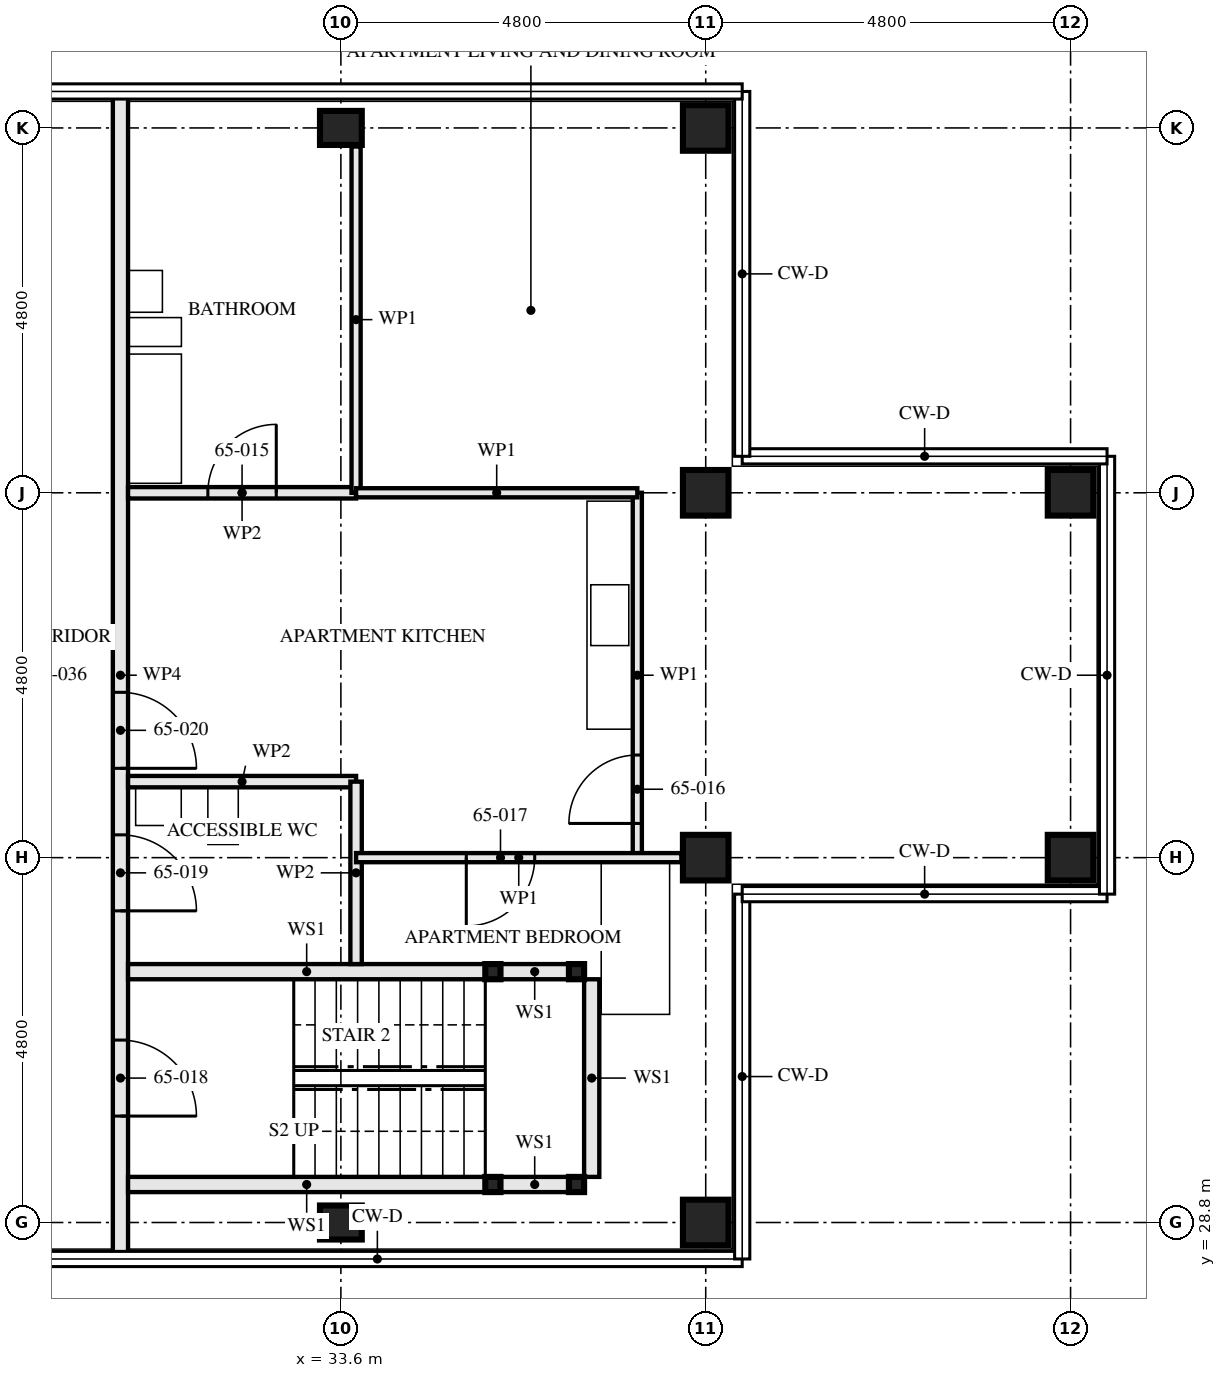
"""IFC4 building model, lengths in metres.
Left out: names, types, materials, properties, quantities, classifications, styles, units other than length and angle.
Written with IfcOpenShell. Run it as: python <this file> out.ifc"""

import sys

from ifc_helpers import new_model, si_unit, direction, frame, frame_2d, origin, origin_2d, place, context, subcontext, project, spatial, rectangle, hollow_rectangle, i_section, extrude, element, fill, save


model = new_model("IFC4")
c1 = context("Model", 3, precision=1e-05, world=origin(), true_north=direction((0.0, 1.0)))
c2 = subcontext(c1, "Body", "Model", "MODEL_VIEW")
j1 = project(units=[si_unit("LENGTHUNIT", "METRE"), si_unit("PLANEANGLEUNIT", "RADIAN")], contexts=[c1])
p1 = place(None, origin())
s1 = spatial("IfcSite", under=j1, at=p1, CompositionType="ELEMENT")
p2 = place(p1, origin())
s2 = spatial("IfcBuilding", under=s1, at=p2, CompositionType="ELEMENT")
p3 = place(p2, frame((0.0, 0.0, 236.5)))
s3 = spatial("IfcBuildingStorey", under=s2, at=p3, CompositionType="ELEMENT", Elevation=236.5)
for number, where, z_axis, x_axis in (
    (1, (33.6, 28.8, 0.0), (0.0, 0.0, 1.0), (0.0, 1.0, 0.0)),
    (2, (33.6, 43.2, 0.0), (0.0, 0.0, 1.0), (0.0, 1.0, 0.0)),
):
    element("IfcColumn", number, at=place(p3, frame(where, z_axis=z_axis, x_axis=x_axis)), inside=s3, PredefinedType="COLUMN", context=c2, shape_type="SweptSolid", body=[
        extrude(i_section(OverallWidth=0.448, OverallDepth=0.55, WebThickness=0.072, FlangeThickness=0.115, FilletRadius=0.015, at=origin_2d()), origin(), (0.0, 0.0, 1.0), 3.5),
    ])
for number, where, z_axis, x_axis in (
    (3, (38.4, 28.8, 0.0), (0.0, 0.0, 1.0), (0.0, 1.0, 0.0)),
    (4, (38.4, 33.6, 0.0), (0.0, 0.0, 1.0), (0.0, 1.0, 0.0)),
    (5, (38.4, 38.4, 0.0), (0.0, 0.0, 1.0), (0.0, 1.0, 0.0)),
    (6, (38.4, 43.2, 0.0), (0.0, 0.0, 1.0), (0.0, 1.0, 0.0)),
    (7, (43.2, 33.6, 0.0), (0.0, 0.0, 1.0), (0.0, 1.0, 0.0)),
    (8, (43.2, 38.4, 0.0), (0.0, 0.0, 1.0), (0.0, 1.0, 0.0)),
):
    element("IfcColumn", number, at=place(p3, frame(where, z_axis=z_axis, x_axis=x_axis)), inside=s3, PredefinedType="COLUMN", context=c2, shape_type="SweptSolid", body=[
        extrude(hollow_rectangle(XDim=0.6, YDim=0.6, WallThickness=0.05, at=origin_2d()), origin(), (0.0, 0.0, 1.0), 3.5),
    ])
for number, where, z_axis, x_axis in (
    (9, (36.7, 29.3, 0.0), (0.0, 0.0, 1.0), (1.0, 0.0, 0.0)),
    (10, (36.7, 32.1, 0.0), (0.0, 0.0, 1.0), (1.0, 0.0, 0.0)),
    (11, (35.6, 29.3, 0.0), (0.0, 0.0, 1.0), (1.0, 0.0, 0.0)),
    (12, (35.6, 32.1, 0.0), (0.0, 0.0, 1.0), (1.0, 0.0, 0.0)),
):
    element("IfcColumn", number, at=place(p3, frame(where, z_axis=z_axis, x_axis=x_axis)), inside=s3, PredefinedType="COLUMN", context=c2, shape_type="SweptSolid", body=[
        extrude(hollow_rectangle(XDim=0.2, YDim=0.2, WallThickness=0.008, at=origin_2d()), origin(), (0.0, 0.0, 1.0), 3.33),
    ])
p4 = place(p3, frame((36.6, 29.3, 0.0), z_axis=(0.0, 0.0, 1.0), x_axis=(-1.0, 0.0, 0.0)))
e13 = element("IfcWall", 13, at=p4, inside=s3, PredefinedType="SOLIDWALL", context=c2, shape_type="SweptSolid", body=[
    extrude(rectangle(XDim=0.9, YDim=0.2, at=frame_2d((0.45, 0.0))), origin(), (0.0, 0.0, 1.0), 2.99),
])
p5 = place(p3, frame((35.5, 29.3, 0.0), z_axis=(0.0, 0.0, 1.0), x_axis=(-1.0, 0.0, 0.0)))
e14 = element("IfcWall", 14, at=p5, inside=s3, PredefinedType="SOLIDWALL", context=c2, shape_type="SweptSolid", body=[
    extrude(rectangle(XDim=4.7, YDim=0.2, at=frame_2d((2.35, 0.0))), origin(), (0.0, 0.0, 1.0), 2.99),
])
p6 = place(p3, frame((36.6, 32.1, 0.0), z_axis=(0.0, 0.0, 1.0), x_axis=(-1.0, 0.0, 0.0)))
e15 = element("IfcWall", 15, at=p6, inside=s3, PredefinedType="SOLIDWALL", context=c2, shape_type="SweptSolid", body=[
    extrude(rectangle(XDim=0.9, YDim=0.2, at=frame_2d((0.45, 0.0))), origin(), (0.0, 0.0, 1.0), 2.99),
])
p7 = place(p3, frame((35.5, 32.1, 0.0), z_axis=(0.0, 0.0, 1.0), x_axis=(-1.0, 0.0, 0.0)))
e16 = element("IfcWall", 16, at=p7, inside=s3, PredefinedType="SOLIDWALL", context=c2, shape_type="SweptSolid", body=[
    extrude(rectangle(XDim=4.7, YDim=0.2, at=frame_2d((2.35, 0.0))), origin(), (0.0, 0.0, 1.0), 2.99),
])
p8 = place(p3, frame((36.9, 29.4, 0.0), z_axis=(0.0, 0.0, 1.0), x_axis=(0.0, 1.0, 0.0)))
e17 = element("IfcWall", 17, at=p8, inside=s3, PredefinedType="SOLIDWALL", context=c2, shape_type="SweptSolid", body=[
    extrude(rectangle(XDim=2.6, YDim=0.2, at=frame_2d((1.3, 0.0))), origin(), (0.0, 0.0, 1.0), 3.33),
])
p9 = place(p3, frame((33.8, 32.2, 0.0), z_axis=(0.0, 0.0, 1.0), x_axis=(0.0, 1.0, 0.0)))
e18 = element("IfcWall", 18, at=p9, inside=s3, PredefinedType="PARTITIONING", context=c2, shape_type="SweptSolid", body=[
    extrude(rectangle(XDim=2.4, YDim=0.15, at=frame_2d((1.2, 0.0))), origin(), (0.0, 0.0, 1.0), 2.55),
])
p10 = place(p3, frame((33.8, 34.6, 0.0), z_axis=(0.0, 0.0, 1.0), x_axis=(-1.0, 0.0, 0.0)))
e19 = element("IfcWall", 19, at=p10, inside=s3, PredefinedType="PARTITIONING", context=c2, shape_type="SweptSolid", body=[
    extrude(rectangle(XDim=3.0, YDim=0.15, at=frame_2d((1.5, 0.0))), origin(), (0.0, 0.0, 1.0), 3.33),
])
p11 = place(p3, frame((33.8, 38.4, 0.0), z_axis=(0.0, 0.0, 1.0), x_axis=(-1.0, 0.0, 0.0)))
e20 = element("IfcWall", 20, at=p11, inside=s3, PredefinedType="PARTITIONING", context=c2, shape_type="SweptSolid", body=[
    extrude(rectangle(XDim=3.0, YDim=0.15, at=frame_2d((1.5, 0.0))), origin(), (0.0, 0.0, 1.0), 2.55),
])
p12 = place(p11, frame((1.05, 0.0, 0.0)))
e21 = element("IfcOpeningElement", 21, at=p12, cuts=e20, PredefinedType="OPENING", context=c2, shape_type="SweptSolid", body=[
    extrude(rectangle(XDim=0.9, YDim=2.1, at=frame_2d((0.45, 1.05))), frame((0.0, 0.085, 0.0), z_axis=(0.0, -1.0, 0.0), x_axis=(1.0, 0.0, 0.0)), (0.0, 0.0, 1.0), 0.171),
])
p13 = place(p3, frame((37.5, 33.6, 0.0), z_axis=(0.0, 0.0, 1.0), x_axis=(0.0, 1.0, 0.0)))
e22 = element("IfcWall", 22, at=p13, inside=s3, PredefinedType="PARTITIONING", context=c2, shape_type="SweptSolid", body=[
    extrude(rectangle(XDim=4.8, YDim=0.12, at=frame_2d((2.4, 0.0))), origin(), (0.0, 0.0, 1.0), 3.33),
])
p14 = place(p13, frame((0.45, 0.0, 0.0)))
e23 = element("IfcOpeningElement", 23, at=p14, cuts=e22, PredefinedType="OPENING", context=c2, shape_type="SweptSolid", body=[
    extrude(rectangle(XDim=0.9, YDim=2.1, at=frame_2d((0.45, 1.05))), frame((0.0, 0.071, 0.0), z_axis=(0.0, -1.0, 0.0), x_axis=(1.0, 0.0, 0.0)), (0.0, 0.0, 1.0), 0.141),
])
p15 = place(p3, frame((33.8, 38.4, 0.0), z_axis=(0.0, 0.0, 1.0), x_axis=(0.0, 1.0, 0.0)))
e24 = element("IfcWall", 24, at=p15, inside=s3, PredefinedType="PARTITIONING", context=c2, shape_type="SweptSolid", body=[
    extrude(rectangle(XDim=4.556, YDim=0.12, at=frame_2d((2.278, 0.0))), origin(), (0.0, 0.0, 1.0), 3.33),
])
p16 = place(p3, frame((38.08, 33.6, 0.0), z_axis=(0.0, 0.0, 1.0), x_axis=(-1.0, 0.0, 0.0)))
e25 = element("IfcWall", 25, at=p16, inside=s3, PredefinedType="PARTITIONING", context=c2, shape_type="SweptSolid", body=[
    extrude(rectangle(XDim=4.28, YDim=0.12, at=frame_2d((2.14, 0.0))), origin(), (0.0, 0.0, 1.0), 2.55),
])
p17 = place(p16, frame((1.93, 0.0, 0.0)))
e26 = element("IfcOpeningElement", 26, at=p17, cuts=e25, PredefinedType="OPENING", context=c2, shape_type="SweptSolid", body=[
    extrude(rectangle(XDim=0.9, YDim=2.1, at=frame_2d((0.45, 1.05))), frame((0.0, 0.071, 0.0), z_axis=(0.0, -1.0, 0.0), x_axis=(1.0, 0.0, 0.0)), (0.0, 0.0, 1.0), 0.141),
])
p18 = place(p3, frame((37.5, 38.4, 0.0), z_axis=(0.0, 0.0, 1.0), x_axis=(-1.0, 0.0, 0.0)))
e27 = element("IfcWall", 27, at=p18, inside=s3, PredefinedType="PARTITIONING", context=c2, shape_type="SweptSolid", body=[
    extrude(rectangle(XDim=3.7, YDim=0.12, at=frame_2d((1.85, 0.0))), origin(), (0.0, 0.0, 1.0), 2.55),
])
p19 = place(p3, frame((30.7, 28.345, 0.0), z_axis=(0.0, 0.0, 1.0), x_axis=(0.0, 1.0, 0.0)))
e28 = element("IfcWall", 28, at=p19, inside=s3, PredefinedType="PARTITIONING", context=c2, shape_type="SweptSolid", body=[
    extrude(rectangle(XDim=15.31, YDim=0.2, at=frame_2d((7.655, 0.0))), origin(), (0.0, 0.0, 1.0), 2.32),
])
p20 = place(p19, frame((1.855, 0.0, 0.0)))
e29 = element("IfcOpeningElement", 29, at=p20, cuts=e28, PredefinedType="OPENING", context=c2, shape_type="SweptSolid", body=[
    extrude(rectangle(XDim=1.0, YDim=2.1, at=frame_2d((0.5, 1.05))), frame((0.0, 0.111, 0.0), z_axis=(0.0, -1.0, 0.0), x_axis=(1.0, 0.0, 0.0)), (0.0, 0.0, 1.0), 0.221),
])
p21 = place(p19, frame((4.555, 0.0, 0.0)))
e30 = element("IfcOpeningElement", 30, at=p21, cuts=e28, PredefinedType="OPENING", context=c2, shape_type="SweptSolid", body=[
    extrude(rectangle(XDim=1.0, YDim=2.1, at=frame_2d((0.5, 1.05))), frame((0.0, 0.111, 0.0), z_axis=(0.0, -1.0, 0.0), x_axis=(1.0, 0.0, 0.0)), (0.0, 0.0, 1.0), 0.221),
])
p22 = place(p19, frame((6.43, 0.0, 0.0)))
e31 = element("IfcOpeningElement", 31, at=p22, cuts=e28, PredefinedType="OPENING", context=c2, shape_type="SweptSolid", body=[
    extrude(rectangle(XDim=1.0, YDim=2.1, at=frame_2d((0.5, 1.05))), frame((0.0, 0.111, 0.0), z_axis=(0.0, -1.0, 0.0), x_axis=(1.0, 0.0, 0.0)), (0.0, 0.0, 1.0), 0.221),
])
p23 = place(p12, frame((0.9, 0.0, 0.0), z_axis=(0.0, 0.0, 1.0), x_axis=(-1.0, 0.0, 0.0)))
e32 = element("IfcDoor", 32, at=p23, inside=s3, OperationType="SINGLE_SWING_LEFT", PredefinedType="DOOR", context=c2, shape_type="SweptSolid", body=[
    extrude(rectangle(XDim=0.9, YDim=2.1, at=frame_2d((0.45, 1.05))), frame((0.0, 0.022, 0.0), z_axis=(0.0, -1.0, 0.0), x_axis=(1.0, 0.0, 0.0)), (0.0, 0.0, 1.0), 0.044),
])
fill(e21, e32)
p24 = place(p14, origin())
e33 = element("IfcDoor", 33, at=p24, inside=s3, OperationType="SINGLE_SWING_RIGHT", PredefinedType="DOOR", context=c2, shape_type="SweptSolid", body=[
    extrude(rectangle(XDim=0.9, YDim=2.1, at=frame_2d((0.45, 1.05))), frame((0.0, 0.022, 0.0), z_axis=(0.0, -1.0, 0.0), x_axis=(1.0, 0.0, 0.0)), (0.0, 0.0, 1.0), 0.044),
])
fill(e23, e33)
p25 = place(p17, origin())
e34 = element("IfcDoor", 34, at=p25, inside=s3, OperationType="SINGLE_SWING_LEFT", PredefinedType="DOOR", context=c2, shape_type="SweptSolid", body=[
    extrude(rectangle(XDim=0.9, YDim=2.1, at=frame_2d((0.45, 1.05))), frame((0.0, 0.022, 0.0), z_axis=(0.0, -1.0, 0.0), x_axis=(1.0, 0.0, 0.0)), (0.0, 0.0, 1.0), 0.044),
])
fill(e26, e34)
p26 = place(p20, frame((1.0, 0.0, 0.0), z_axis=(0.0, 0.0, 1.0), x_axis=(-1.0, 0.0, 0.0)))
e35 = element("IfcDoor", 35, at=p26, inside=s3, OperationType="SINGLE_SWING_LEFT", PredefinedType="DOOR", context=c2, shape_type="SweptSolid", body=[
    extrude(rectangle(XDim=1.0, YDim=2.1, at=frame_2d((0.5, 1.05))), frame((0.0, 0.032, 0.0), z_axis=(0.0, -1.0, 0.0), x_axis=(1.0, 0.0, 0.0)), (0.0, 0.0, 1.0), 0.064),
])
fill(e29, e35)
p27 = place(p21, frame((1.0, 0.0, 0.0), z_axis=(0.0, 0.0, 1.0), x_axis=(-1.0, 0.0, 0.0)))
e36 = element("IfcDoor", 36, at=p27, inside=s3, OperationType="SINGLE_SWING_LEFT", PredefinedType="DOOR", context=c2, shape_type="SweptSolid", body=[
    extrude(rectangle(XDim=1.0, YDim=2.1, at=frame_2d((0.5, 1.05))), frame((0.0, 0.027, 0.0), z_axis=(0.0, -1.0, 0.0), x_axis=(1.0, 0.0, 0.0)), (0.0, 0.0, 1.0), 0.054),
])
fill(e30, e36)
p28 = place(p22, frame((1.0, 0.0, 0.0), z_axis=(0.0, 0.0, 1.0), x_axis=(-1.0, 0.0, 0.0)))
e37 = element("IfcDoor", 37, at=p28, inside=s3, OperationType="SINGLE_SWING_LEFT", PredefinedType="DOOR", context=c2, shape_type="SweptSolid", body=[
    extrude(rectangle(XDim=1.0, YDim=2.1, at=frame_2d((0.5, 1.05))), frame((0.0, 0.027, 0.0), z_axis=(0.0, -1.0, 0.0), x_axis=(1.0, 0.0, 0.0)), (0.0, 0.0, 1.0), 0.054),
])
fill(e31, e37)
save(model, sys.argv[1])
